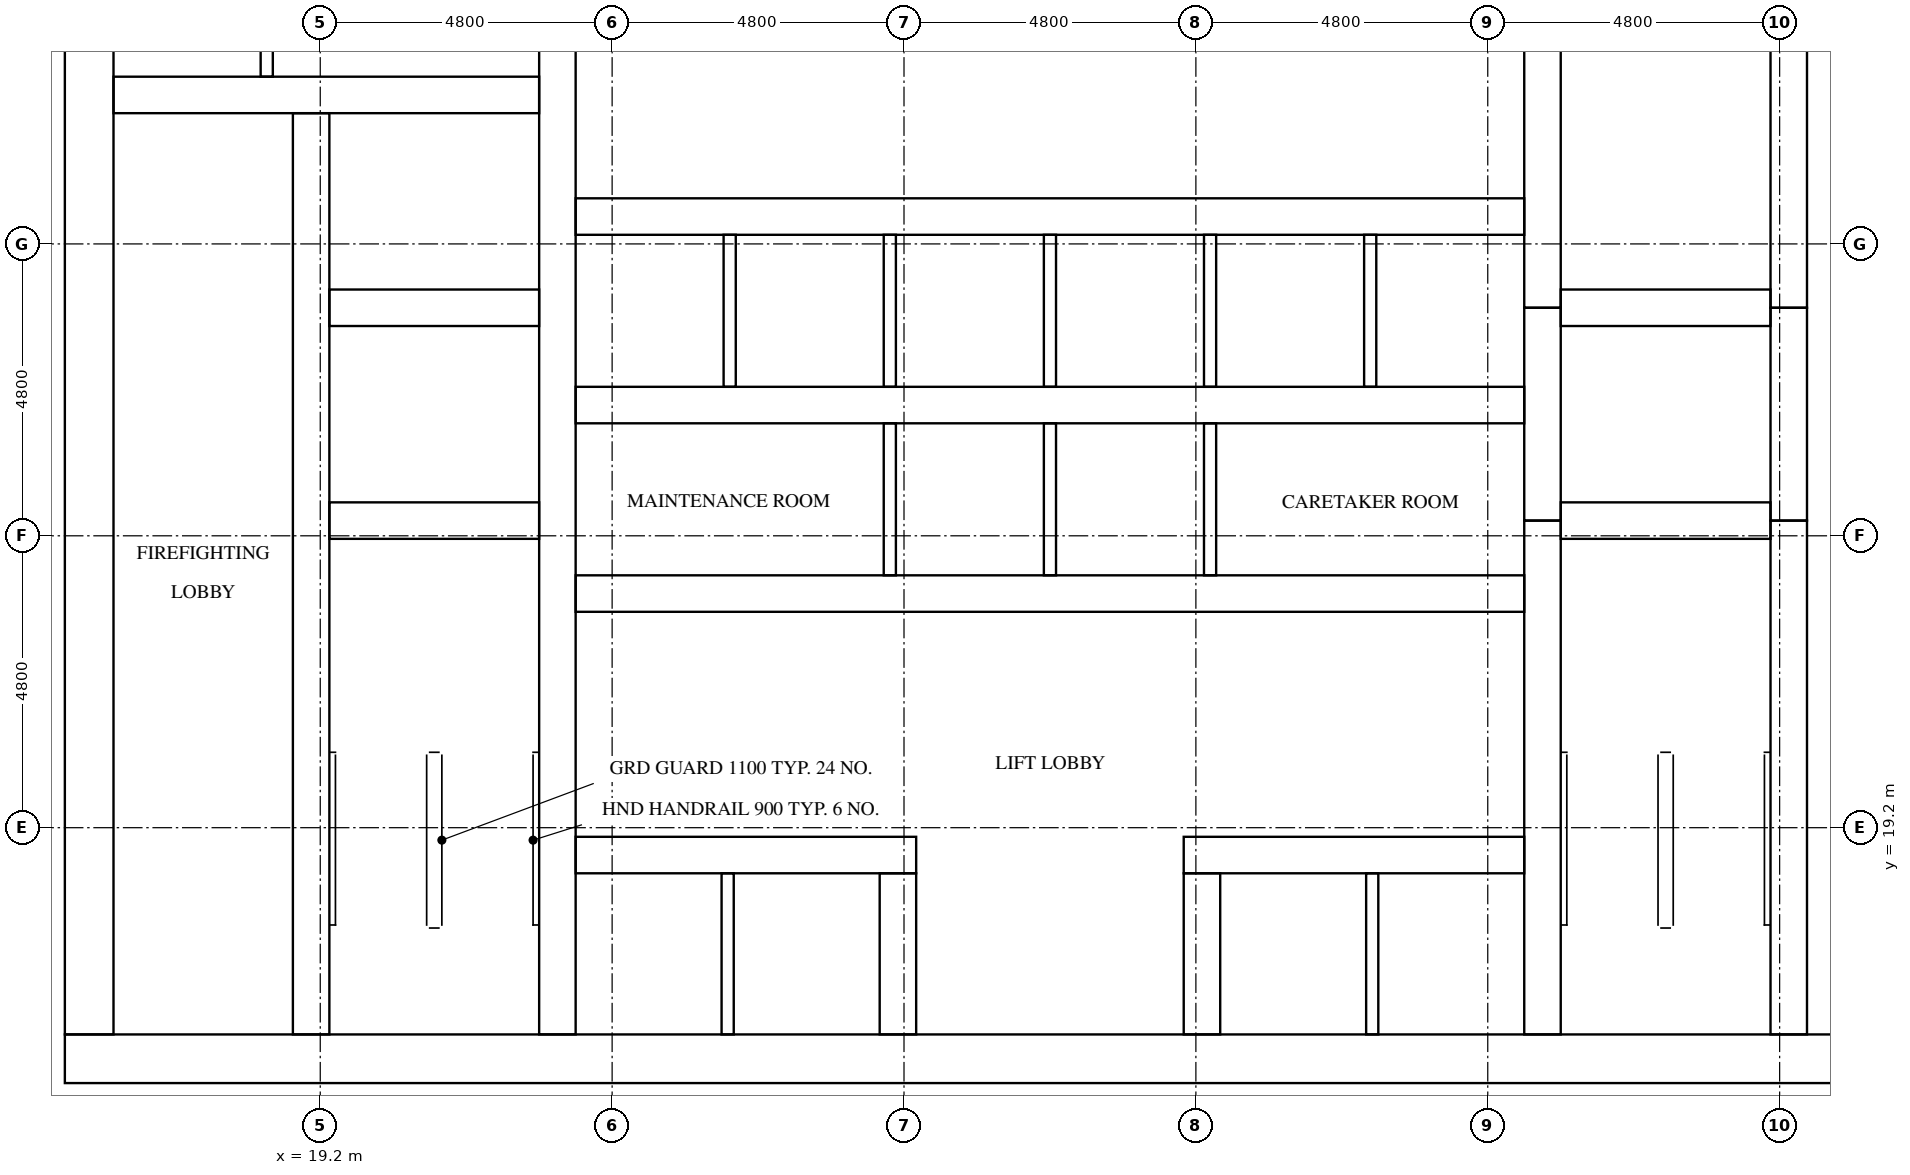
"""IFC4 building model, lengths in metres.
Left out: names, types, materials, properties, quantities, classifications, styles, units other than length and angle.
Written with IfcOpenShell. Run it as: python <this file> out.ifc"""

import sys

from ifc_helpers import new_model, si_unit, direction, frame, frame_2d, origin, place, context, subcontext, project, spatial, rectangle, extrude, element, fill, save


model = new_model("IFC4")
c1 = context("Model", 3, precision=1e-05, world=origin(), true_north=direction((0.0, 1.0)))
c2 = subcontext(c1, "Body", "Model", "MODEL_VIEW")
j1 = project(units=[si_unit("LENGTHUNIT", "METRE"), si_unit("PLANEANGLEUNIT", "RADIAN")], contexts=[c1])
p1 = place(None, origin())
s1 = spatial("IfcSite", under=j1, at=p1, CompositionType="ELEMENT")
p2 = place(p1, origin())
s2 = spatial("IfcBuilding", under=s1, at=p2, CompositionType="ELEMENT")
p3 = place(p2, frame((0.0, 0.0, 140.1)))
s3 = spatial("IfcBuildingStorey", under=s2, at=p3, CompositionType="ELEMENT", Elevation=140.1)
p4 = place(p3, frame((15.0, 15.4, 0.0), z_axis=(0.0, 0.0, 1.0), x_axis=(1.0, 0.0, 0.0)))
e1 = element("IfcWall", 1, at=p4, inside=s3, PredefinedType="SHEAR", context=c2, shape_type="SweptSolid", body=[
    extrude(rectangle(XDim=32.4, YDim=0.8, at=frame_2d((16.2, 0.0))), origin(), (0.0, 0.0, 1.0), 3.1),
])
p5 = place(p4, frame((15.3, 0.0, 0.0)))
e2 = element("IfcOpeningElement", 2, at=p5, cuts=e1, PredefinedType="OPENING", context=c2, shape_type="SweptSolid", body=[
    extrude(rectangle(XDim=1.8, YDim=2.1, at=frame_2d((0.9, 1.05))), frame((0.0, 0.41, 0.0), z_axis=(0.0, -1.0, 0.0), x_axis=(1.0, 0.0, 0.0)), (0.0, 0.0, 1.0), 0.82),
])
p6 = place(p3, frame((15.4, 15.8, 0.0), z_axis=(0.0, 0.0, 1.0), x_axis=(0.0, 1.0, 0.0)))
e3 = element("IfcWall", 3, at=p6, inside=s3, PredefinedType="SHEAR", context=c2, shape_type="SweptSolid", body=[
    extrude(rectangle(XDim=21.2, YDim=0.8, at=frame_2d((10.6, 0.0))), origin(), (0.0, 0.0, 1.0), 3.1),
])
p7 = place(p6, frame((4.96, 0.0, 0.0)))
e4 = element("IfcOpeningElement", 4, at=p7, cuts=e3, PredefinedType="OPENING", context=c2, shape_type="SweptSolid", body=[
    extrude(rectangle(XDim=1.2, YDim=2.1, at=frame_2d((0.6, 1.05))), frame((0.0, 0.41, 0.0), z_axis=(0.0, -1.0, 0.0), x_axis=(1.0, 0.0, 0.0)), (0.0, 0.0, 1.0), 0.82),
])
p8 = place(p3, frame((19.05, 15.8, 0.0), z_axis=(0.0, 0.0, 1.0), x_axis=(0.0, 1.0, 0.0)))
e5 = element("IfcWall", 5, at=p8, inside=s3, PredefinedType="SHEAR", context=c2, shape_type="SweptSolid", body=[
    extrude(rectangle(XDim=15.15, YDim=0.6, at=frame_2d((7.575, 0.0))), origin(), (0.0, 0.0, 1.0), 3.1),
])
p9 = place(p8, frame((9.65, 0.0, 0.0)))
e6 = element("IfcOpeningElement", 6, at=p9, cuts=e5, PredefinedType="OPENING", context=c2, shape_type="SweptSolid", body=[
    extrude(rectangle(XDim=1.1, YDim=2.1, at=frame_2d((0.55, 1.05))), frame((0.0, 0.31, 0.0), z_axis=(0.0, -1.0, 0.0), x_axis=(1.0, 0.0, 0.0)), (0.0, 0.0, 1.0), 0.62),
])
p10 = place(p8, frame((13.15, 0.0, 0.0)))
e7 = element("IfcOpeningElement", 7, at=p10, cuts=e5, PredefinedType="OPENING", context=c2, shape_type="SweptSolid", body=[
    extrude(rectangle(XDim=1.1, YDim=2.1, at=frame_2d((0.55, 1.05))), frame((0.0, 0.31, 0.0), z_axis=(0.0, -1.0, 0.0), x_axis=(1.0, 0.0, 0.0)), (0.0, 0.0, 1.0), 0.62),
])
p11 = place(p8, frame((0.4, 0.0, 0.0)))
e8 = element("IfcOpeningElement", 8, at=p11, cuts=e5, PredefinedType="OPENING", context=c2, shape_type="SweptSolid", body=[
    extrude(rectangle(XDim=1.2, YDim=2.1, at=frame_2d((0.6, 1.05))), frame((0.0, 0.31, 0.0), z_axis=(0.0, -1.0, 0.0), x_axis=(1.0, 0.0, 0.0)), (0.0, 0.0, 1.0), 0.62),
])
p12 = place(p3, frame((23.1, 15.8, 0.0), z_axis=(0.0, 0.0, 1.0), x_axis=(0.0, 1.0, 0.0)))
e9 = element("IfcWall", 9, at=p12, inside=s3, PredefinedType="SHEAR", context=c2, shape_type="SweptSolid", body=[
    extrude(rectangle(XDim=21.2, YDim=0.6, at=frame_2d((10.6, 0.0))), origin(), (0.0, 0.0, 1.0), 3.1),
])
p13 = place(p3, frame((39.3, 15.8, 0.0), z_axis=(0.0, 0.0, 1.0), x_axis=(0.0, 1.0, 0.0)))
e10 = element("IfcWall", 10, at=p13, inside=s3, PredefinedType="SHEAR", context=c2, shape_type="SweptSolid", body=[
    extrude(rectangle(XDim=8.45, YDim=0.6, at=frame_2d((4.225, 0.0))), origin(), (0.0, 0.0, 1.0), 3.1),
])
p14 = place(p3, frame((39.3, 24.25, 0.0), z_axis=(0.0, 0.0, 1.0), x_axis=(0.0, 1.0, 0.0)))
e11 = element("IfcWall", 11, at=p14, inside=s3, PredefinedType="SHEAR", context=c2, shape_type="SweptSolid", body=[
    extrude(rectangle(XDim=3.5, YDim=0.6, at=frame_2d((1.75, 0.0))), origin(), (0.0, 0.0, 1.0), 3.1),
])
p15 = place(p3, frame((39.3, 27.75, 0.0), z_axis=(0.0, 0.0, 1.0), x_axis=(0.0, 1.0, 0.0)))
e12 = element("IfcWall", 12, at=p15, inside=s3, PredefinedType="SHEAR", context=c2, shape_type="SweptSolid", body=[
    extrude(rectangle(XDim=9.25, YDim=0.6, at=frame_2d((4.625, 0.0))), origin(), (0.0, 0.0, 1.0), 3.1),
])
p16 = place(p3, frame((43.35, 15.8, 0.0), z_axis=(0.0, 0.0, 1.0), x_axis=(0.0, 1.0, 0.0)))
e13 = element("IfcWall", 13, at=p16, inside=s3, PredefinedType="SHEAR", context=c2, shape_type="SweptSolid", body=[
    extrude(rectangle(XDim=8.45, YDim=0.6, at=frame_2d((4.225, 0.0))), origin(), (0.0, 0.0, 1.0), 3.1),
])
p17 = place(p16, frame((0.4, 0.0, 0.0)))
e14 = element("IfcOpeningElement", 14, at=p17, cuts=e13, PredefinedType="OPENING", context=c2, shape_type="SweptSolid", body=[
    extrude(rectangle(XDim=1.2, YDim=2.1, at=frame_2d((0.6, 1.05))), frame((0.0, 0.31, 0.0), z_axis=(0.0, -1.0, 0.0), x_axis=(1.0, 0.0, 0.0)), (0.0, 0.0, 1.0), 0.62),
])
p18 = place(p3, frame((43.35, 24.25, 0.0), z_axis=(0.0, 0.0, 1.0), x_axis=(0.0, 1.0, 0.0)))
e15 = element("IfcWall", 15, at=p18, inside=s3, PredefinedType="SHEAR", context=c2, shape_type="SweptSolid", body=[
    extrude(rectangle(XDim=3.5, YDim=0.6, at=frame_2d((1.75, 0.0))), origin(), (0.0, 0.0, 1.0), 3.1),
])
p19 = place(p18, frame((1.2, 0.0, 0.0)))
e16 = element("IfcOpeningElement", 16, at=p19, cuts=e15, PredefinedType="OPENING", context=c2, shape_type="SweptSolid", body=[
    extrude(rectangle(XDim=1.1, YDim=2.1, at=frame_2d((0.55, 1.05))), frame((0.0, 0.31, 0.0), z_axis=(0.0, -1.0, 0.0), x_axis=(1.0, 0.0, 0.0)), (0.0, 0.0, 1.0), 0.62),
])
p20 = place(p3, frame((43.35, 27.75, 0.0), z_axis=(0.0, 0.0, 1.0), x_axis=(0.0, 1.0, 0.0)))
e17 = element("IfcWall", 17, at=p20, inside=s3, PredefinedType="SHEAR", context=c2, shape_type="SweptSolid", body=[
    extrude(rectangle(XDim=9.25, YDim=0.6, at=frame_2d((4.625, 0.0))), origin(), (0.0, 0.0, 1.0), 3.1),
])
p21 = place(p20, frame((7.65, 0.0, 0.0)))
e18 = element("IfcOpeningElement", 18, at=p21, cuts=e17, PredefinedType="OPENING", context=c2, shape_type="SweptSolid", body=[
    extrude(rectangle(XDim=1.2, YDim=2.1, at=frame_2d((0.6, 1.05))), frame((0.0, 0.31, 0.0), z_axis=(0.0, -1.0, 0.0), x_axis=(1.0, 0.0, 0.0)), (0.0, 0.0, 1.0), 0.62),
])
for number, where, z_axis, x_axis in (
    (19, (19.35, 24.25, 0.0), (0.0, 0.0, 1.0), (1.0, 0.0, 0.0)),
    (20, (19.35, 27.75, 0.0), (0.0, 0.0, 1.0), (1.0, 0.0, 0.0)),
):
    element("IfcWall", number, at=place(p3, frame(where, z_axis=z_axis, x_axis=x_axis)), inside=s3, PredefinedType="SHEAR", context=c2, shape_type="SweptSolid", body=[
        extrude(rectangle(XDim=3.45, YDim=0.6, at=frame_2d((1.725, 0.0))), origin(), (0.0, 0.0, 1.0), 3.1),
    ])
p22 = place(p3, frame((15.8, 31.25, 0.0), z_axis=(0.0, 0.0, 1.0), x_axis=(1.0, 0.0, 0.0)))
e21 = element("IfcWall", 21, at=p22, inside=s3, PredefinedType="SHEAR", context=c2, shape_type="SweptSolid", body=[
    extrude(rectangle(XDim=7.0, YDim=0.6, at=frame_2d((3.5, 0.0))), origin(), (0.0, 0.0, 1.0), 3.1),
])
for number, where, z_axis, x_axis in (
    (22, (39.6, 24.25, 0.0), (0.0, 0.0, 1.0), (1.0, 0.0, 0.0)),
    (23, (39.6, 27.75, 0.0), (0.0, 0.0, 1.0), (1.0, 0.0, 0.0)),
):
    element("IfcWall", number, at=place(p3, frame(where, z_axis=z_axis, x_axis=x_axis)), inside=s3, PredefinedType="SHEAR", context=c2, shape_type="SweptSolid", body=[
        extrude(rectangle(XDim=3.45, YDim=0.6, at=frame_2d((1.725, 0.0))), origin(), (0.0, 0.0, 1.0), 3.1),
    ])
p23 = place(p3, frame((23.4, 18.75, 0.0), z_axis=(0.0, 0.0, 1.0), x_axis=(1.0, 0.0, 0.0)))
e24 = element("IfcWall", 24, at=p23, inside=s3, PredefinedType="SHEAR", context=c2, shape_type="SweptSolid", body=[
    extrude(rectangle(XDim=5.6, YDim=0.6, at=frame_2d((2.8, 0.0))), origin(), (0.0, 0.0, 1.0), 3.1),
])
p24 = place(p23, frame((0.65, 0.0, 0.0)))
e25 = element("IfcOpeningElement", 25, at=p24, cuts=e24, PredefinedType="OPENING", context=c2, shape_type="SweptSolid", body=[
    extrude(rectangle(XDim=1.1, YDim=2.1, at=frame_2d((0.55, 1.05))), frame((0.0, 0.31, 0.0), z_axis=(0.0, -1.0, 0.0), x_axis=(1.0, 0.0, 0.0)), (0.0, 0.0, 1.0), 0.62),
])
p25 = place(p23, frame((3.25, 0.0, 0.0)))
e26 = element("IfcOpeningElement", 26, at=p25, cuts=e24, PredefinedType="OPENING", context=c2, shape_type="SweptSolid", body=[
    extrude(rectangle(XDim=1.1, YDim=2.1, at=frame_2d((0.55, 1.05))), frame((0.0, 0.31, 0.0), z_axis=(0.0, -1.0, 0.0), x_axis=(1.0, 0.0, 0.0)), (0.0, 0.0, 1.0), 0.62),
])
p26 = place(p3, frame((33.4, 18.75, 0.0), z_axis=(0.0, 0.0, 1.0), x_axis=(1.0, 0.0, 0.0)))
e27 = element("IfcWall", 27, at=p26, inside=s3, PredefinedType="SHEAR", context=c2, shape_type="SweptSolid", body=[
    extrude(rectangle(XDim=5.6, YDim=0.6, at=frame_2d((2.8, 0.0))), origin(), (0.0, 0.0, 1.0), 3.1),
])
p27 = place(p26, frame((1.25, 0.0, 0.0)))
e28 = element("IfcOpeningElement", 28, at=p27, cuts=e27, PredefinedType="OPENING", context=c2, shape_type="SweptSolid", body=[
    extrude(rectangle(XDim=1.1, YDim=2.1, at=frame_2d((0.55, 1.05))), frame((0.0, 0.31, 0.0), z_axis=(0.0, -1.0, 0.0), x_axis=(1.0, 0.0, 0.0)), (0.0, 0.0, 1.0), 0.62),
])
p28 = place(p26, frame((3.85, 0.0, 0.0)))
e29 = element("IfcOpeningElement", 29, at=p28, cuts=e27, PredefinedType="OPENING", context=c2, shape_type="SweptSolid", body=[
    extrude(rectangle(XDim=1.1, YDim=2.1, at=frame_2d((0.55, 1.05))), frame((0.0, 0.31, 0.0), z_axis=(0.0, -1.0, 0.0), x_axis=(1.0, 0.0, 0.0)), (0.0, 0.0, 1.0), 0.62),
])
p29 = place(p3, frame((23.4, 23.05, 0.0), z_axis=(0.0, 0.0, 1.0), x_axis=(1.0, 0.0, 0.0)))
e30 = element("IfcWall", 30, at=p29, inside=s3, PredefinedType="SHEAR", context=c2, shape_type="SweptSolid", body=[
    extrude(rectangle(XDim=15.6, YDim=0.6, at=frame_2d((7.8, 0.0))), origin(), (0.0, 0.0, 1.0), 3.1),
])
p30 = place(p29, frame((2.033, 0.0, 0.0)))
e31 = element("IfcOpeningElement", 31, at=p30, cuts=e30, PredefinedType="OPENING", context=c2, shape_type="SweptSolid", body=[
    extrude(rectangle(XDim=1.0, YDim=2.1, at=frame_2d((0.5, 1.05))), frame((0.0, 0.31, 0.0), z_axis=(0.0, -1.0, 0.0), x_axis=(1.0, 0.0, 0.0)), (0.0, 0.0, 1.0), 0.62),
])
p31 = place(p29, frame((12.567, 0.0, 0.0)))
e32 = element("IfcOpeningElement", 32, at=p31, cuts=e30, PredefinedType="OPENING", context=c2, shape_type="SweptSolid", body=[
    extrude(rectangle(XDim=1.0, YDim=2.1, at=frame_2d((0.5, 1.05))), frame((0.0, 0.31, 0.0), z_axis=(0.0, -1.0, 0.0), x_axis=(1.0, 0.0, 0.0)), (0.0, 0.0, 1.0), 0.62),
])
for number, where, z_axis, x_axis in (
    (33, (23.4, 26.15, 0.0), (0.0, 0.0, 1.0), (1.0, 0.0, 0.0)),
    (34, (23.4, 29.25, 0.0), (0.0, 0.0, 1.0), (1.0, 0.0, 0.0)),
):
    element("IfcWall", number, at=place(p3, frame(where, z_axis=z_axis, x_axis=x_axis)), inside=s3, PredefinedType="SHEAR", context=c2, shape_type="SweptSolid", body=[
        extrude(rectangle(XDim=15.6, YDim=0.6, at=frame_2d((7.8, 0.0))), origin(), (0.0, 0.0, 1.0), 3.1),
    ])
for number, where, z_axis, x_axis in (
    (35, (28.7, 15.8, 0.0), (0.0, 0.0, 1.0), (0.0, 1.0, 0.0)),
    (36, (33.7, 15.8, 0.0), (0.0, 0.0, 1.0), (0.0, 1.0, 0.0)),
):
    element("IfcWall", number, at=place(p3, frame(where, z_axis=z_axis, x_axis=x_axis)), inside=s3, PredefinedType="SHEAR", context=c2, shape_type="SweptSolid", body=[
        extrude(rectangle(XDim=2.65, YDim=0.6, at=frame_2d((1.325, 0.0))), origin(), (0.0, 0.0, 1.0), 3.1),
    ])
for number, where, z_axis, x_axis in (
    (37, (25.933, 26.45, 0.0), (0.0, 0.0, 1.0), (0.0, 1.0, 0.0)),
    (38, (28.567, 23.35, 0.0), (0.0, 0.0, 1.0), (0.0, 1.0, 0.0)),
    (39, (28.567, 26.45, 0.0), (0.0, 0.0, 1.0), (0.0, 1.0, 0.0)),
    (40, (31.2, 23.35, 0.0), (0.0, 0.0, 1.0), (0.0, 1.0, 0.0)),
    (41, (31.2, 26.45, 0.0), (0.0, 0.0, 1.0), (0.0, 1.0, 0.0)),
    (42, (33.833, 23.35, 0.0), (0.0, 0.0, 1.0), (0.0, 1.0, 0.0)),
    (43, (33.833, 26.45, 0.0), (0.0, 0.0, 1.0), (0.0, 1.0, 0.0)),
    (44, (36.467, 26.45, 0.0), (0.0, 0.0, 1.0), (0.0, 1.0, 0.0)),
):
    element("IfcWall", number, at=place(p3, frame(where, z_axis=z_axis, x_axis=x_axis)), inside=s3, PredefinedType="SOLIDWALL", context=c2, shape_type="SweptSolid", body=[
        extrude(rectangle(XDim=2.5, YDim=0.2, at=frame_2d((1.25, 0.0))), origin(), (0.0, 0.0, 1.0), 3.1),
    ])
for number, where, z_axis, x_axis in (
    (45, (25.9, 15.8, 0.0), (0.0, 0.0, 1.0), (0.0, 1.0, 0.0)),
    (46, (36.5, 15.8, 0.0), (0.0, 0.0, 1.0), (0.0, 1.0, 0.0)),
):
    element("IfcWall", number, at=place(p3, frame(where, z_axis=z_axis, x_axis=x_axis)), inside=s3, PredefinedType="SOLIDWALL", context=c2, shape_type="SweptSolid", body=[
        extrude(rectangle(XDim=2.65, YDim=0.2, at=frame_2d((1.325, 0.0))), origin(), (0.0, 0.0, 1.0), 3.1),
    ])
p32 = place(p3, frame((18.32, 31.55, 0.0), z_axis=(0.0, 0.0, 1.0), x_axis=(0.0, 1.0, 0.0)))
e47 = element("IfcWall", 47, at=p32, inside=s3, PredefinedType="PARTITIONING", context=c2, shape_type="SweptSolid", body=[
    extrude(rectangle(XDim=5.45, YDim=0.2, at=frame_2d((2.725, 0.0))), origin(), (0.0, 0.0, 1.0), 3.1),
])
p33 = place(p24, origin())
e48 = element("IfcDoor", 48, at=p33, inside=s3, OperationType="DOUBLE_DOOR_SLIDING", PredefinedType="DOOR", context=c2, shape_type="SweptSolid", body=[
    extrude(rectangle(XDim=1.1, YDim=2.1, at=frame_2d((0.55, 1.05))), frame((0.0, 0.025, 0.0), z_axis=(0.0, -1.0, 0.0), x_axis=(1.0, 0.0, 0.0)), (0.0, 0.0, 1.0), 0.05),
])
fill(e25, e48)
p34 = place(p25, origin())
e49 = element("IfcDoor", 49, at=p34, inside=s3, OperationType="DOUBLE_DOOR_SLIDING", PredefinedType="DOOR", context=c2, shape_type="SweptSolid", body=[
    extrude(rectangle(XDim=1.1, YDim=2.1, at=frame_2d((0.55, 1.05))), frame((0.0, 0.025, 0.0), z_axis=(0.0, -1.0, 0.0), x_axis=(1.0, 0.0, 0.0)), (0.0, 0.0, 1.0), 0.05),
])
fill(e26, e49)
p35 = place(p27, origin())
e50 = element("IfcDoor", 50, at=p35, inside=s3, OperationType="DOUBLE_DOOR_SLIDING", PredefinedType="DOOR", context=c2, shape_type="SweptSolid", body=[
    extrude(rectangle(XDim=1.1, YDim=2.1, at=frame_2d((0.55, 1.05))), frame((0.0, 0.025, 0.0), z_axis=(0.0, -1.0, 0.0), x_axis=(1.0, 0.0, 0.0)), (0.0, 0.0, 1.0), 0.05),
])
fill(e28, e50)
p36 = place(p28, origin())
e51 = element("IfcDoor", 51, at=p36, inside=s3, OperationType="DOUBLE_DOOR_SLIDING", PredefinedType="DOOR", context=c2, shape_type="SweptSolid", body=[
    extrude(rectangle(XDim=1.1, YDim=2.1, at=frame_2d((0.55, 1.05))), frame((0.0, 0.025, 0.0), z_axis=(0.0, -1.0, 0.0), x_axis=(1.0, 0.0, 0.0)), (0.0, 0.0, 1.0), 0.05),
])
fill(e29, e51)
p37 = place(p9, origin())
e52 = element("IfcDoor", 52, at=p37, inside=s3, OperationType="DOUBLE_DOOR_SLIDING", PredefinedType="DOOR", context=c2, shape_type="SweptSolid", body=[
    extrude(rectangle(XDim=1.1, YDim=2.1, at=frame_2d((0.55, 1.05))), frame((0.0, 0.025, 0.0), z_axis=(0.0, -1.0, 0.0), x_axis=(1.0, 0.0, 0.0)), (0.0, 0.0, 1.0), 0.05),
])
fill(e6, e52)
p38 = place(p10, origin())
e53 = element("IfcDoor", 53, at=p38, inside=s3, OperationType="DOUBLE_DOOR_SLIDING", PredefinedType="DOOR", context=c2, shape_type="SweptSolid", body=[
    extrude(rectangle(XDim=1.1, YDim=2.1, at=frame_2d((0.55, 1.05))), frame((0.0, 0.025, 0.0), z_axis=(0.0, -1.0, 0.0), x_axis=(1.0, 0.0, 0.0)), (0.0, 0.0, 1.0), 0.05),
])
fill(e7, e53)
p39 = place(p19, origin())
e54 = element("IfcDoor", 54, at=p39, inside=s3, OperationType="DOUBLE_DOOR_SLIDING", PredefinedType="DOOR", context=c2, shape_type="SweptSolid", body=[
    extrude(rectangle(XDim=1.1, YDim=2.1, at=frame_2d((0.55, 1.05))), frame((0.0, 0.025, 0.0), z_axis=(0.0, -1.0, 0.0), x_axis=(1.0, 0.0, 0.0)), (0.0, 0.0, 1.0), 0.05),
])
fill(e16, e54)
p40 = place(p11, frame((1.2, 0.0, 0.0), z_axis=(0.0, 0.0, 1.0), x_axis=(-1.0, 0.0, 0.0)))
e55 = element("IfcDoor", 55, at=p40, inside=s3, OperationType="SINGLE_SWING_RIGHT", PredefinedType="DOOR", context=c2, shape_type="SweptSolid", body=[
    extrude(rectangle(XDim=1.2, YDim=2.1, at=frame_2d((0.6, 1.05))), frame((0.0, 0.025, 0.0), z_axis=(0.0, -1.0, 0.0), x_axis=(1.0, 0.0, 0.0)), (0.0, 0.0, 1.0), 0.05),
])
fill(e8, e55)
p41 = place(p17, origin())
e56 = element("IfcDoor", 56, at=p41, inside=s3, OperationType="SINGLE_SWING_LEFT", PredefinedType="DOOR", context=c2, shape_type="SweptSolid", body=[
    extrude(rectangle(XDim=1.2, YDim=2.1, at=frame_2d((0.6, 1.05))), frame((0.0, 0.025, 0.0), z_axis=(0.0, -1.0, 0.0), x_axis=(1.0, 0.0, 0.0)), (0.0, 0.0, 1.0), 0.05),
])
fill(e14, e56)
p42 = place(p5, frame((1.8, 0.0, 0.0), z_axis=(0.0, 0.0, 1.0), x_axis=(-1.0, 0.0, 0.0)))
e57 = element("IfcDoor", 57, at=p42, inside=s3, OperationType="DOUBLE_DOOR_SINGLE_SWING", PredefinedType="DOOR", context=c2, shape_type="SweptSolid", body=[
    extrude(rectangle(XDim=1.8, YDim=2.1, at=frame_2d((0.9, 1.05))), frame((0.0, 0.025, 0.0), z_axis=(0.0, -1.0, 0.0), x_axis=(1.0, 0.0, 0.0)), (0.0, 0.0, 1.0), 0.05),
])
fill(e2, e57)
p43 = place(p7, frame((1.2, 0.0, 0.0), z_axis=(0.0, 0.0, 1.0), x_axis=(-1.0, 0.0, 0.0)))
e58 = element("IfcDoor", 58, at=p43, inside=s3, OperationType="SINGLE_SWING_LEFT", PredefinedType="DOOR", context=c2, shape_type="SweptSolid", body=[
    extrude(rectangle(XDim=1.2, YDim=2.1, at=frame_2d((0.6, 1.05))), frame((0.0, 0.025, 0.0), z_axis=(0.0, -1.0, 0.0), x_axis=(1.0, 0.0, 0.0)), (0.0, 0.0, 1.0), 0.05),
])
fill(e4, e58)
p44 = place(p30, frame((1.0, 0.0, 0.0), z_axis=(0.0, 0.0, 1.0), x_axis=(-1.0, 0.0, 0.0)))
e59 = element("IfcDoor", 59, at=p44, inside=s3, OperationType="SINGLE_SWING_LEFT", PredefinedType="DOOR", context=c2, shape_type="SweptSolid", body=[
    extrude(rectangle(XDim=1.0, YDim=2.1, at=frame_2d((0.5, 1.05))), frame((0.0, 0.025, 0.0), z_axis=(0.0, -1.0, 0.0), x_axis=(1.0, 0.0, 0.0)), (0.0, 0.0, 1.0), 0.05),
])
fill(e31, e59)
p45 = place(p31, frame((1.0, 0.0, 0.0), z_axis=(0.0, 0.0, 1.0), x_axis=(-1.0, 0.0, 0.0)))
e60 = element("IfcDoor", 60, at=p45, inside=s3, OperationType="SINGLE_SWING_RIGHT", PredefinedType="DOOR", context=c2, shape_type="SweptSolid", body=[
    extrude(rectangle(XDim=1.0, YDim=2.1, at=frame_2d((0.5, 1.05))), frame((0.0, 0.025, 0.0), z_axis=(0.0, -1.0, 0.0), x_axis=(1.0, 0.0, 0.0)), (0.0, 0.0, 1.0), 0.05),
])
fill(e32, e60)
save(model, sys.argv[1])
